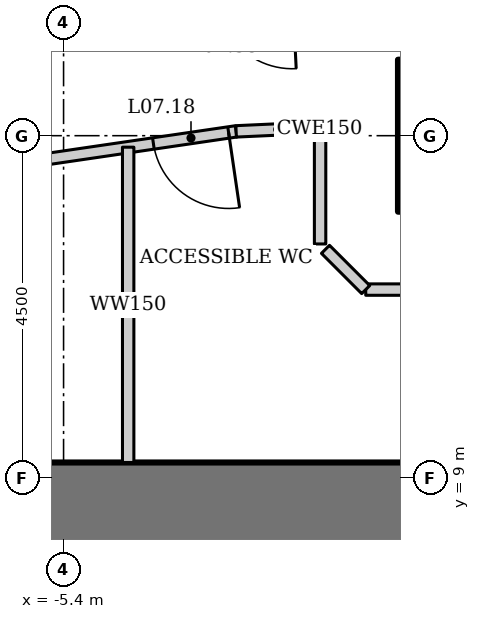
"""IFC4 building model, lengths in metres.
Left out: names, types, materials, properties, quantities, classifications, styles, units other than length and angle.
Written with IfcOpenShell. Run it as: python <this file> out.ifc"""

import sys

from ifc_helpers import new_model, si_unit, direction, frame, frame_2d, origin, origin_2d, place, context, subcontext, project, spatial, rectangle, hollow_rectangle, extrude, element, fill, save


model = new_model("IFC4")
c1 = context("Model", 3, precision=1e-05, world=origin(), true_north=direction((0.0, 1.0)))
c2 = subcontext(c1, "Body", "Model", "MODEL_VIEW")
j1 = project(units=[si_unit("LENGTHUNIT", "METRE"), si_unit("PLANEANGLEUNIT", "RADIAN")], contexts=[c1])
p1 = place(None, origin())
s1 = spatial("IfcSite", under=j1, at=p1, CompositionType="ELEMENT")
p2 = place(p1, origin())
s2 = spatial("IfcBuilding", under=s1, at=p2, CompositionType="ELEMENT")
p3 = place(p2, frame((0.0, 0.0, 40.6)))
s3 = spatial("IfcBuildingStorey", under=s2, at=p3, CompositionType="ELEMENT", Elevation=40.6)
p4 = place(p3, frame((0.0, 13.5, 0.0), z_axis=(0.0, 0.0, 1.0), x_axis=(1.0, 0.0, 0.0)))
e1 = element("IfcColumn", 1, at=p4, inside=s3, PredefinedType="COLUMN", context=c2, shape_type="SweptSolid", body=[
    extrude(hollow_rectangle(XDim=2.0, YDim=2.0, WallThickness=0.17, at=origin_2d()), origin(), (0.0, 0.0, 1.0), 3.6),
])
p5 = place(p3, frame((12.2, 8.0, 0.0), z_axis=(0.0, 0.0, 1.0), x_axis=(-1.0, 0.0, 0.0)))
e2 = element("IfcWall", 2, at=p5, inside=s3, PredefinedType="SHEAR", context=c2, shape_type="SweptSolid", body=[
    extrude(rectangle(XDim=24.4, YDim=2.4, at=frame_2d((12.2, 0.0))), origin(), (0.0, 0.0, 1.0), 3.6),
])
p6 = place(p3, frame((-3.13, 13.557, 0.0), z_axis=(0.0, 0.0, 1.0), x_axis=(-0.989443047021, -0.14492224364, 0.0)))
e3 = element("IfcWall", 3, at=p6, inside=s3, PredefinedType="PARTITIONING", context=c2, shape_type="SweptSolid", body=[
    extrude(rectangle(XDim=3.553, YDim=0.15, at=frame_2d((1.776, 0.0))), origin(), (0.0, 0.0, 1.0), 3.45),
])
p7 = place(p6, frame((0.1, 0.0, 0.0)))
e4 = element("IfcOpeningElement", 4, at=p7, cuts=e3, PredefinedType="OPENING", context=c2, shape_type="SweptSolid", body=[
    extrude(rectangle(XDim=1.0, YDim=2.1, at=frame_2d((0.5, 1.05))), frame((0.0, 0.085, 0.0), z_axis=(0.0, -1.0, 0.0), x_axis=(1.0, 0.0, 0.0)), (0.0, 0.0, 1.0), 0.17),
])
p8 = place(p3, frame((-4.55, 9.2, 0.0), z_axis=(0.0, 0.0, 1.0), x_axis=(0.0, 1.0, 0.0)))
e5 = element("IfcWall", 5, at=p8, inside=s3, PredefinedType="SOLIDWALL", context=c2, shape_type="SweptSolid", body=[
    extrude(rectangle(XDim=4.149, YDim=0.15, at=frame_2d((2.074, 0.0))), origin(), (0.0, 0.0, 1.0), 3.45),
])
p9 = place(p3, frame((-2.035, 13.607, 0.0), z_axis=(0.0, 0.0, 1.0), x_axis=(-0.998946843147, -0.045882508292, 0.0)))
e6 = element("IfcWall", 6, at=p9, inside=s3, PredefinedType="PARTITIONING", context=c2, shape_type="SweptSolid", body=[
    extrude(rectangle(XDim=1.096, YDim=0.15, at=frame_2d((0.548, 0.0))), origin(), (0.0, 0.0, 1.0), 3.45),
])
p10 = place(p3, frame((-2.025, 12.075, 0.0), z_axis=(0.0, 0.0, 1.0), x_axis=(0.0, 1.0, 0.0)))
e7 = element("IfcWall", 7, at=p10, inside=s3, PredefinedType="PARTITIONING", context=c2, shape_type="SweptSolid", body=[
    extrude(rectangle(XDim=1.427, YDim=0.15, at=frame_2d((0.714, 0.0))), origin(), (0.0, 0.0, 1.0), 2.749),
])
p11 = place(p3, frame((-0.103, 11.475, 0.0), z_axis=(0.0, 0.0, 1.0), x_axis=(-1.0, 0.0, 0.0)))
e8 = element("IfcWall", 8, at=p11, inside=s3, PredefinedType="PARTITIONING", context=c2, shape_type="SweptSolid", body=[
    extrude(rectangle(XDim=1.321, YDim=0.15, at=frame_2d((0.661, 0.0))), origin(), (0.0, 0.0, 1.0), 3.45),
])
p12 = place(p3, frame((-1.425, 11.475, 0.0), z_axis=(0.0, 0.0, 1.0), x_axis=(-0.707269727782, 0.706943797032, 0.0)))
e9 = element("IfcWall", 9, at=p12, inside=s3, PredefinedType="PARTITIONING", context=c2, shape_type="SweptSolid", body=[
    extrude(rectangle(XDim=0.749, YDim=0.15, at=frame_2d((0.375, 0.0))), origin(), (0.0, 0.0, 1.0), 3.45),
])
p13 = place(p7, origin())
e10 = element("IfcDoor", 10, at=p13, inside=s3, OperationType="SINGLE_SWING_LEFT", PredefinedType="DOOR", context=c2, shape_type="SweptSolid", body=[
    extrude(rectangle(XDim=1.0, YDim=2.1, at=frame_2d((0.5, 1.05))), frame((0.0, 0.025, 0.0), z_axis=(0.0, -1.0, 0.0), x_axis=(1.0, 0.0, 0.0)), (0.0, 0.0, 1.0), 0.05),
])
fill(e4, e10)
save(model, sys.argv[1])
